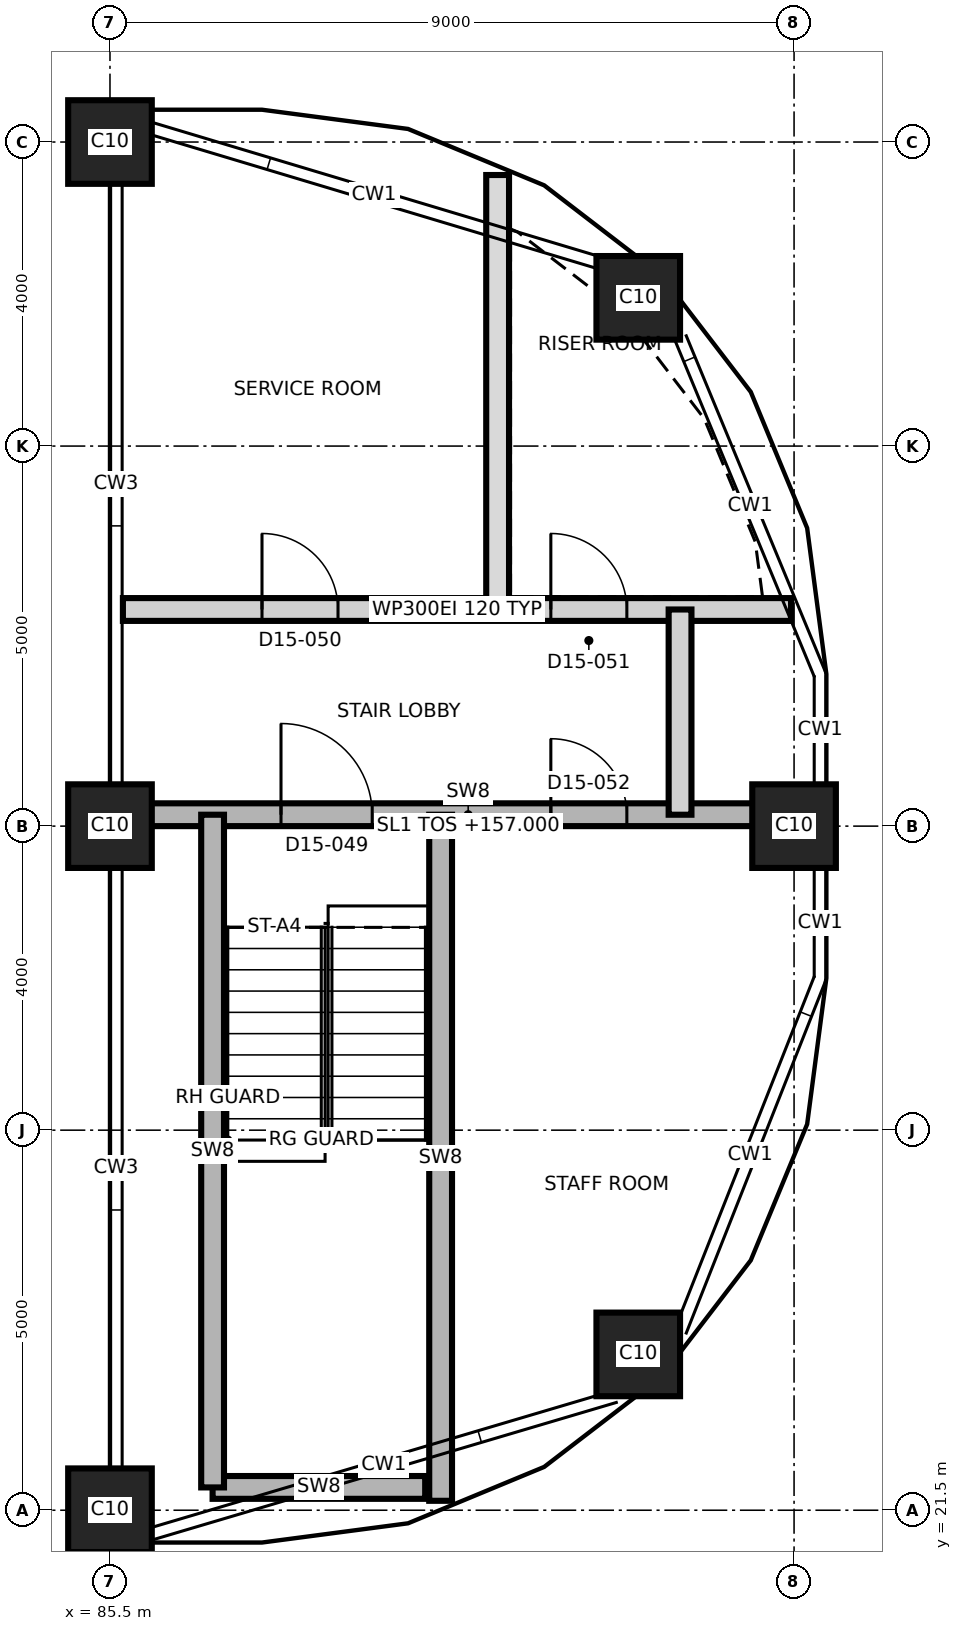
"""IFC4 building model, lengths in metres.
Left out: names, types, materials, properties, quantities, classifications, styles, units other than length and angle.
Written with IfcOpenShell. Run it as: python <this file> out.ifc"""

import sys

from ifc_helpers import new_model, si_unit, direction, frame, frame_2d, origin, origin_2d, place, context, subcontext, project, spatial, rectangle, extrude, element, fill, save


model = new_model("IFC4")
c1 = context("Model", 3, precision=1e-05, world=origin(), true_north=direction((0.0, 1.0)))
c2 = subcontext(c1, "Body", "Model", "MODEL_VIEW")
j1 = project(units=[si_unit("LENGTHUNIT", "METRE"), si_unit("PLANEANGLEUNIT", "RADIAN")], contexts=[c1])
p1 = place(None, origin())
s1 = spatial("IfcSite", under=j1, at=p1, CompositionType="ELEMENT")
p2 = place(p1, origin())
s2 = spatial("IfcBuilding", under=s1, at=p2, CompositionType="ELEMENT")
p3 = place(p2, frame((0.0, 0.0, 157.0)))
s3 = spatial("IfcBuildingStorey", under=s2, at=p3, CompositionType="ELEMENT", Elevation=157.0)
for number, where, z_axis, x_axis in (
    (1, (85.5, 21.5, 0.0), (0.0, 0.0, 1.0), (1.0, 0.0, 0.0)),
    (2, (92.45, 23.55, 0.0), (0.0, 0.0, 1.0), (1.0, 0.0, 0.0)),
    (3, (85.5, 30.5, 0.0), (0.0, 0.0, 1.0), (1.0, 0.0, 0.0)),
    (4, (94.5, 30.5, 0.0), (0.0, 0.0, 1.0), (1.0, 0.0, 0.0)),
    (5, (92.45, 37.45, 0.0), (0.0, 0.0, 1.0), (1.0, 0.0, 0.0)),
    (6, (85.5, 39.5, 0.0), (0.0, 0.0, 1.0), (1.0, 0.0, 0.0)),
):
    element("IfcColumn", number, at=place(p3, frame(where, z_axis=z_axis, x_axis=x_axis)), inside=s3, PredefinedType="COLUMN", context=c2, shape_type="SweptSolid", body=[
        extrude(rectangle(XDim=1.1, YDim=1.1, at=origin_2d()), origin(), (0.0, 0.0, 1.0), 3.7),
    ])
p4 = place(p3, frame((86.85, 21.8, 0.0), z_axis=(0.0, 0.0, 1.0), x_axis=(1.0, 0.0, 0.0)))
e7 = element("IfcWall", 7, at=p4, inside=s3, PredefinedType="SHEAR", context=c2, shape_type="SweptSolid", body=[
    extrude(rectangle(XDim=2.797, YDim=0.3, at=frame_2d((1.398, 0.0))), origin(), (0.0, 0.0, 1.0), 3.4),
])
p5 = place(p3, frame((85.85, 30.65, 0.0), z_axis=(0.0, 0.0, 1.0), x_axis=(1.0, 0.0, 0.0)))
e8 = element("IfcWall", 8, at=p5, inside=s3, PredefinedType="SHEAR", context=c2, shape_type="SweptSolid", body=[
    extrude(rectangle(XDim=8.725, YDim=0.3, at=frame_2d((4.362, 0.0))), origin(), (0.0, 0.0, 1.0), 3.4),
])
p6 = place(p5, frame((1.9, 0.0, 0.0)))
e9 = element("IfcOpeningElement", 9, at=p6, cuts=e8, PredefinedType="OPENING", context=c2, shape_type="SweptSolid", body=[
    extrude(rectangle(XDim=1.2, YDim=2.1, at=frame_2d((0.6, 1.05))), frame((0.0, 0.16, 0.0), z_axis=(0.0, -1.0, 0.0), x_axis=(1.0, 0.0, 0.0)), (0.0, 0.0, 1.0), 0.32),
])
p7 = place(p5, frame((5.45, 0.0, 0.0)))
e10 = element("IfcOpeningElement", 10, at=p7, cuts=e8, PredefinedType="OPENING", context=c2, shape_type="SweptSolid", body=[
    extrude(rectangle(XDim=1.0, YDim=2.1, at=frame_2d((0.5, 1.05))), frame((0.0, 0.16, 0.0), z_axis=(0.0, -1.0, 0.0), x_axis=(1.0, 0.0, 0.0)), (0.0, 0.0, 1.0), 0.32),
])
p8 = place(p3, frame((85.67, 33.35, 0.0), z_axis=(0.0, 0.0, 1.0), x_axis=(1.0, 0.0, 0.0)))
e11 = element("IfcWall", 11, at=p8, inside=s3, PredefinedType="PARTITIONING", context=c2, shape_type="SweptSolid", body=[
    extrude(rectangle(XDim=8.79, YDim=0.3, at=frame_2d((4.395, 0.0))), origin(), (0.0, 0.0, 1.0), 3.4),
])
p9 = place(p8, frame((1.83, 0.0, 0.0)))
e12 = element("IfcOpeningElement", 12, at=p9, cuts=e11, PredefinedType="OPENING", context=c2, shape_type="SweptSolid", body=[
    extrude(rectangle(XDim=1.0, YDim=2.1, at=frame_2d((0.5, 1.05))), frame((0.0, 0.16, 0.0), z_axis=(0.0, -1.0, 0.0), x_axis=(1.0, 0.0, 0.0)), (0.0, 0.0, 1.0), 0.32),
])
p10 = place(p8, frame((5.63, 0.0, 0.0)))
e13 = element("IfcOpeningElement", 13, at=p10, cuts=e11, PredefinedType="OPENING", context=c2, shape_type="SweptSolid", body=[
    extrude(rectangle(XDim=1.0, YDim=2.1, at=frame_2d((0.5, 1.05))), frame((0.0, 0.16, 0.0), z_axis=(0.0, -1.0, 0.0), x_axis=(1.0, 0.0, 0.0)), (0.0, 0.0, 1.0), 0.32),
])
p11 = place(p3, frame((86.85, 21.8, 0.0), z_axis=(0.0, 0.0, 1.0), x_axis=(0.0, 1.0, 0.0)))
e14 = element("IfcWall", 14, at=p11, inside=s3, PredefinedType="SHEAR", context=c2, shape_type="SweptSolid", body=[
    extrude(rectangle(XDim=8.85, YDim=0.3, at=frame_2d((4.425, 0.0))), origin(), (0.0, 0.0, 1.0), 3.4),
])
p12 = place(p3, frame((89.85, 21.624, 0.0), z_axis=(0.0, 0.0, 1.0), x_axis=(0.0, 1.0, 0.0)))
e15 = element("IfcWall", 15, at=p12, inside=s3, PredefinedType="SHEAR", context=c2, shape_type="SweptSolid", body=[
    extrude(rectangle(XDim=9.026, YDim=0.3, at=frame_2d((4.513, 0.0))), origin(), (0.0, 0.0, 1.0), 3.4),
])
p13 = place(p3, frame((90.6, 33.35, 0.0), z_axis=(0.0, 0.0, 1.0), x_axis=(0.0, 1.0, 0.0)))
e16 = element("IfcWall", 16, at=p13, inside=s3, PredefinedType="PARTITIONING", context=c2, shape_type="SweptSolid", body=[
    extrude(rectangle(XDim=5.716, YDim=0.3, at=frame_2d((2.858, 0.0))), origin(), (0.0, 0.0, 1.0), 3.4),
])
p14 = place(p3, frame((93.0, 30.65, 0.0), z_axis=(0.0, 0.0, 1.0), x_axis=(0.0, 1.0, 0.0)))
e17 = element("IfcWall", 17, at=p14, inside=s3, PredefinedType="PARTITIONING", context=c2, shape_type="SweptSolid", body=[
    extrude(rectangle(XDim=2.7, YDim=0.3, at=frame_2d((1.35, 0.0))), origin(), (0.0, 0.0, 1.0), 3.4),
])
p15 = place(p6, origin())
e18 = element("IfcDoor", 18, at=p15, inside=s3, OperationType="SINGLE_SWING_LEFT", PredefinedType="DOOR", context=c2, shape_type="SweptSolid", body=[
    extrude(rectangle(XDim=1.2, YDim=2.1, at=frame_2d((0.6, 1.05))), frame((0.0, 0.025, 0.0), z_axis=(0.0, -1.0, 0.0), x_axis=(1.0, 0.0, 0.0)), (0.0, 0.0, 1.0), 0.05),
])
fill(e9, e18)
p16 = place(p9, origin())
e19 = element("IfcDoor", 19, at=p16, inside=s3, OperationType="SINGLE_SWING_LEFT", PredefinedType="DOOR", context=c2, shape_type="SweptSolid", body=[
    extrude(rectangle(XDim=1.0, YDim=2.1, at=frame_2d((0.5, 1.05))), frame((0.0, 0.025, 0.0), z_axis=(0.0, -1.0, 0.0), x_axis=(1.0, 0.0, 0.0)), (0.0, 0.0, 1.0), 0.05),
])
fill(e12, e19)
p17 = place(p10, origin())
e20 = element("IfcDoor", 20, at=p17, inside=s3, OperationType="SINGLE_SWING_RIGHT", PredefinedType="DOOR", context=c2, shape_type="SweptSolid", body=[
    extrude(rectangle(XDim=1.0, YDim=2.1, at=frame_2d((0.5, 1.05))), frame((0.0, 0.025, 0.0), z_axis=(0.0, -1.0, 0.0), x_axis=(1.0, 0.0, 0.0)), (0.0, 0.0, 1.0), 0.05),
])
fill(e13, e20)
p18 = place(p7, origin())
e21 = element("IfcDoor", 21, at=p18, inside=s3, OperationType="SINGLE_SWING_LEFT", PredefinedType="DOOR", context=c2, shape_type="SweptSolid", body=[
    extrude(rectangle(XDim=1.0, YDim=2.1, at=frame_2d((0.5, 1.05))), frame((0.0, 0.025, 0.0), z_axis=(0.0, -1.0, 0.0), x_axis=(1.0, 0.0, 0.0)), (0.0, 0.0, 1.0), 0.05),
])
fill(e10, e21)
save(model, sys.argv[1])
